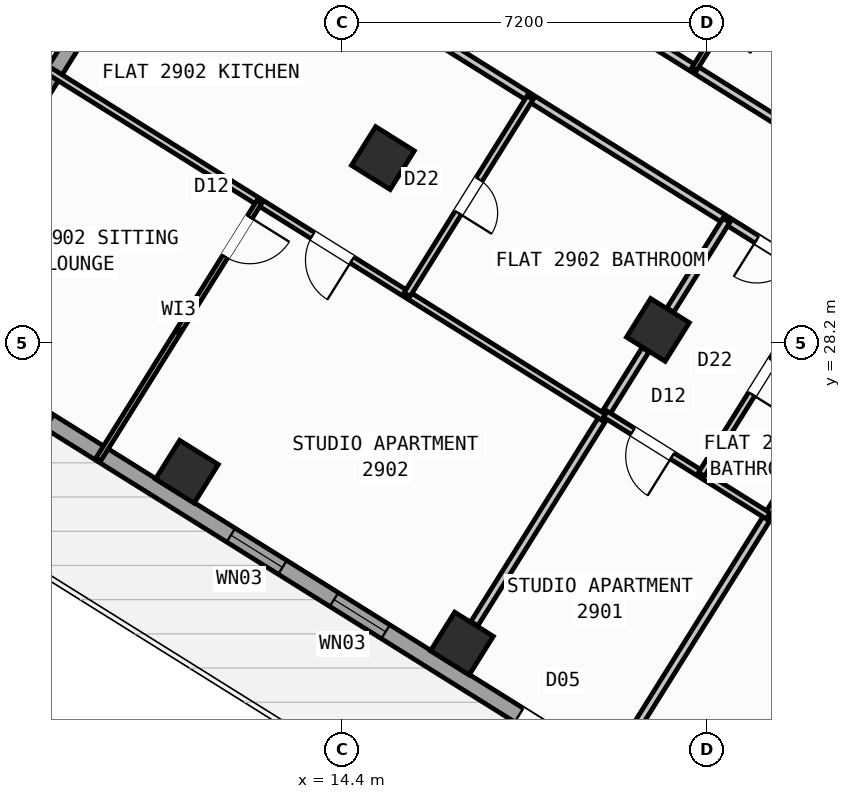
"""IFC4 building model, lengths in metres.
Left out: names, types, materials, properties, quantities, classifications, styles, units other than length and angle.
Written with IfcOpenShell. Run it as: python <this file> out.ifc"""

import sys

from ifc_helpers import new_model, si_unit, direction, frame, frame_2d, origin, origin_2d, place, context, subcontext, project, spatial, rectangle, hollow_rectangle, extrude, source, transform, mapped, element, fill, save


model = new_model("IFC4")
c1 = context("Model", 3, precision=1e-05, world=origin(), true_north=direction((0.0, 1.0)))
c2 = subcontext(c1, "Body", "Model", "MODEL_VIEW")
j1 = project(units=[si_unit("LENGTHUNIT", "METRE"), si_unit("PLANEANGLEUNIT", "RADIAN")], contexts=[c1])
p1 = place(None, origin())
s1 = spatial("IfcSite", under=j1, at=p1, CompositionType="ELEMENT")
p2 = place(p1, origin())
s2 = spatial("IfcBuilding", under=s1, at=p2, CompositionType="ELEMENT")
p3 = place(p2, frame((0.0, 0.0, 116.1)))
s3 = spatial("IfcBuildingStorey", under=s2, at=p3, CompositionType="ELEMENT", Elevation=116.1)
p4 = place(p3, frame((26.007, 24.976, 0.0), z_axis=(0.0, 0.0, 1.0), x_axis=(-0.529923795287, -0.848045264823, 0.0)))
e1 = element("IfcWall", 1, at=p4, inside=s3, PredefinedType="SHEAR", context=c2, shape_type="SweptSolid", body=[
    extrude(rectangle(XDim=6.425, YDim=0.55, at=frame_2d((3.212, 0.0))), origin(), (0.0, 0.0, 1.0), 3.35),
])
m1 = source(origin(), c2, "Body", "SweptSolid", [
    extrude(hollow_rectangle(XDim=0.9, YDim=0.9, WallThickness=0.036, at=origin_2d()), origin(), (0.0, 0.0, 1.0), 3.6),
])
for number, where, z_axis, x_axis in (
    (2, (20.632, 28.452, 0.0), (0.0, 0.0, 1.0), (-0.848, 0.53, 0.0)),
    (3, (16.764, 22.261, 0.0), (0.0, 0.0, 1.0), (-0.848, 0.53, 0.0)),
    (4, (15.205, 31.844, 0.0), (0.0, 0.0, 1.0), (-0.848, 0.53, 0.0)),
    (5, (11.336, 25.653, 0.0), (0.0, 0.0, 1.0), (-0.848, 0.53, 0.0)),
):
    element("IfcColumn", number, at=place(p3, frame(where, z_axis=z_axis, x_axis=x_axis)), inside=s3, PredefinedType="COLUMN", context=c2, shape_type="MappedRepresentation", body=[
        mapped(m1, transform((0.0, 0.0, 0.0), scale=1.0)),
    ])
p5 = place(p3, frame((31.76, 12.183, 0.0), z_axis=(0.0, 0.0, 1.0), x_axis=(-0.848047074256, 0.529920899612, 0.0)))
e6 = element("IfcWall", 6, at=p5, inside=s3, PredefinedType="STANDARD", context=c2, shape_type="SweptSolid", body=[
    extrude(rectangle(XDim=30.652, YDim=0.32, at=frame_2d((15.326, 0.0))), origin(), (0.0, 0.0, 1.0), 3.35),
])
p6 = place(p5, frame((15.153, 0.0, 0.0)))
e7 = element("IfcOpeningElement", 7, at=p6, cuts=e6, PredefinedType="OPENING", context=c2, shape_type="SweptSolid", body=[
    extrude(rectangle(XDim=1.2, YDim=2.15, at=frame_2d((0.6, 1.075))), frame((0.0, 0.17, 0.0), z_axis=(0.0, -1.0, 0.0), x_axis=(1.0, 0.0, 0.0)), (0.0, 0.0, 1.0), 0.34),
])
p7 = place(p5, frame((2.002, 0.0, 0.8)))
e8 = element("IfcOpeningElement", 8, at=p7, cuts=e6, PredefinedType="OPENING", context=c2, shape_type="SweptSolid", body=[
    extrude(rectangle(XDim=2.1, YDim=1.55, at=frame_2d((1.05, 0.775))), frame((0.0, 0.17, 0.0), z_axis=(0.0, -1.0, 0.0), x_axis=(1.0, 0.0, 0.0)), (0.0, 0.0, 1.0), 0.34),
])
p8 = place(p5, frame((7.206, 0.0, 0.8)))
e9 = element("IfcOpeningElement", 9, at=p8, cuts=e6, PredefinedType="OPENING", context=c2, shape_type="SweptSolid", body=[
    extrude(rectangle(XDim=2.1, YDim=1.55, at=frame_2d((1.05, 0.775))), frame((0.0, 0.17, 0.0), z_axis=(0.0, -1.0, 0.0), x_axis=(1.0, 0.0, 0.0)), (0.0, 0.0, 1.0), 0.34),
])
p9 = place(p5, frame((12.648, 0.0, 1.0)))
e10 = element("IfcOpeningElement", 10, at=p9, cuts=e6, PredefinedType="OPENING", context=c2, shape_type="SweptSolid", body=[
    extrude(rectangle(XDim=0.9, YDim=1.25, at=frame_2d((0.45, 0.625))), frame((0.0, 0.17, 0.0), z_axis=(0.0, -1.0, 0.0), x_axis=(1.0, 0.0, 0.0)), (0.0, 0.0, 1.0), 0.34),
])
p10 = place(p5, frame((19.458, 0.0, 0.95)))
e11 = element("IfcOpeningElement", 11, at=p10, cuts=e6, PredefinedType="OPENING", context=c2, shape_type="SweptSolid", body=[
    extrude(rectangle(XDim=1.2, YDim=1.4, at=frame_2d((0.6, 0.7))), frame((0.0, 0.17, 0.0), z_axis=(0.0, -1.0, 0.0), x_axis=(1.0, 0.0, 0.0)), (0.0, 0.0, 1.0), 0.34),
])
p11 = place(p5, frame((21.858, 0.0, 0.95)))
e12 = element("IfcOpeningElement", 12, at=p11, cuts=e6, PredefinedType="OPENING", context=c2, shape_type="SweptSolid", body=[
    extrude(rectangle(XDim=1.2, YDim=1.4, at=frame_2d((0.6, 0.7))), frame((0.0, 0.17, 0.0), z_axis=(0.0, -1.0, 0.0), x_axis=(1.0, 0.0, 0.0)), (0.0, 0.0, 1.0), 0.34),
])
p12 = place(p5, frame((27.266, 0.0, 0.8)))
e13 = element("IfcOpeningElement", 13, at=p12, cuts=e6, PredefinedType="OPENING", context=c2, shape_type="SweptSolid", body=[
    extrude(rectangle(XDim=2.1, YDim=1.55, at=frame_2d((1.05, 0.775))), frame((0.0, 0.17, 0.0), z_axis=(0.0, -1.0, 0.0), x_axis=(1.0, 0.0, 0.0)), (0.0, 0.0, 1.0), 0.34),
])
p13 = place(p3, frame((5.7, 28.71, 0.0), z_axis=(0.0, 0.0, 1.0), x_axis=(0.529923711467, 0.8480453172, 0.0)))
e14 = element("IfcWall", 14, at=p13, inside=s3, PredefinedType="STANDARD", context=c2, shape_type="SweptSolid", body=[
    extrude(rectangle(XDim=21.587, YDim=0.32, at=frame_2d((10.794, 0.0))), origin(), (0.0, 0.0, 1.0), 2.775),
])
p14 = place(p13, frame((2.119, 0.0, 0.8)))
e15 = element("IfcOpeningElement", 15, at=p14, cuts=e14, PredefinedType="OPENING", context=c2, shape_type="SweptSolid", body=[
    extrude(rectangle(XDim=2.1, YDim=1.55, at=frame_2d((1.05, 0.775))), frame((0.0, 0.17, 0.0), z_axis=(0.0, -1.0, 0.0), x_axis=(1.0, 0.0, 0.0)), (0.0, 0.0, 1.0), 0.34),
])
p15 = place(p13, frame((17.256, 0.0, 0.85)))
e16 = element("IfcOpeningElement", 16, at=p15, cuts=e14, PredefinedType="OPENING", context=c2, shape_type="SweptSolid", body=[
    extrude(rectangle(XDim=1.8, YDim=1.5, at=frame_2d((0.9, 0.75))), frame((0.0, 0.17, 0.0), z_axis=(0.0, -1.0, 0.0), x_axis=(1.0, 0.0, 0.0)), (0.0, 0.0, 1.0), 0.34),
])
p16 = place(p3, frame((17.424, 47.083, 0.0), z_axis=(0.0, 0.0, 1.0), x_axis=(0.848049927979, -0.529916332693, 0.0)))
e17 = element("IfcWall", 17, at=p16, inside=s3, PredefinedType="STANDARD", context=c2, shape_type="SweptSolid", body=[
    extrude(rectangle(XDim=29.223, YDim=0.32, at=frame_2d((14.612, 0.0))), origin(), (0.0, 0.0, 1.0), 3.35),
])
p17 = place(p16, frame((8.839, 0.0, 0.0)))
e18 = element("IfcOpeningElement", 18, at=p17, cuts=e17, PredefinedType="OPENING", context=c2, shape_type="SweptSolid", body=[
    extrude(rectangle(XDim=1.05, YDim=2.15, at=frame_2d((0.525, 1.075))), frame((0.0, 0.17, 0.0), z_axis=(0.0, -1.0, 0.0), x_axis=(1.0, 0.0, 0.0)), (0.0, 0.0, 1.0), 0.34),
])
p18 = place(p16, frame((0.719, 0.0, 0.85)))
e19 = element("IfcOpeningElement", 19, at=p18, cuts=e17, PredefinedType="OPENING", context=c2, shape_type="SweptSolid", body=[
    extrude(rectangle(XDim=1.8, YDim=1.5, at=frame_2d((0.9, 0.75))), frame((0.0, 0.17, 0.0), z_axis=(0.0, -1.0, 0.0), x_axis=(1.0, 0.0, 0.0)), (0.0, 0.0, 1.0), 0.34),
])
p19 = place(p16, frame((3.981, 0.0, 0.85)))
e20 = element("IfcOpeningElement", 20, at=p19, cuts=e17, PredefinedType="OPENING", context=c2, shape_type="SweptSolid", body=[
    extrude(rectangle(XDim=1.5, YDim=1.5, at=frame_2d((0.75, 0.75))), frame((0.0, 0.17, 0.0), z_axis=(0.0, -1.0, 0.0), x_axis=(1.0, 0.0, 0.0)), (0.0, 0.0, 1.0), 0.34),
])
p20 = place(p16, frame((7.021, 0.0, 0.95)))
e21 = element("IfcOpeningElement", 21, at=p20, cuts=e17, PredefinedType="OPENING", context=c2, shape_type="SweptSolid", body=[
    extrude(rectangle(XDim=1.2, YDim=1.4, at=frame_2d((0.6, 0.7))), frame((0.0, 0.17, 0.0), z_axis=(0.0, -1.0, 0.0), x_axis=(1.0, 0.0, 0.0)), (0.0, 0.0, 1.0), 0.34),
])
p21 = place(p16, frame((14.471, 0.0, 0.95)))
e22 = element("IfcOpeningElement", 22, at=p21, cuts=e17, PredefinedType="OPENING", context=c2, shape_type="SweptSolid", body=[
    extrude(rectangle(XDim=1.2, YDim=1.4, at=frame_2d((0.6, 0.7))), frame((0.0, 0.17, 0.0), z_axis=(0.0, -1.0, 0.0), x_axis=(1.0, 0.0, 0.0)), (0.0, 0.0, 1.0), 0.34),
])
p22 = place(p16, frame((17.254, 0.0, 1.0)))
e23 = element("IfcOpeningElement", 23, at=p22, cuts=e17, PredefinedType="OPENING", context=c2, shape_type="SweptSolid", body=[
    extrude(rectangle(XDim=0.9, YDim=1.25, at=frame_2d((0.45, 0.625))), frame((0.0, 0.17, 0.0), z_axis=(0.0, -1.0, 0.0), x_axis=(1.0, 0.0, 0.0)), (0.0, 0.0, 1.0), 0.34),
])
p23 = place(p16, frame((20.764, 0.0, 0.8)))
e24 = element("IfcOpeningElement", 24, at=p23, cuts=e17, PredefinedType="OPENING", context=c2, shape_type="SweptSolid", body=[
    extrude(rectangle(XDim=2.1, YDim=1.55, at=frame_2d((1.05, 0.775))), frame((0.0, 0.17, 0.0), z_axis=(0.0, -1.0, 0.0), x_axis=(1.0, 0.0, 0.0)), (0.0, 0.0, 1.0), 0.34),
])
p24 = place(p16, frame((25.403, 0.0, 0.8)))
e25 = element("IfcOpeningElement", 25, at=p24, cuts=e17, PredefinedType="OPENING", context=c2, shape_type="SweptSolid", body=[
    extrude(rectangle(XDim=2.1, YDim=1.55, at=frame_2d((1.05, 0.775))), frame((0.0, 0.17, 0.0), z_axis=(0.0, -1.0, 0.0), x_axis=(1.0, 0.0, 0.0)), (0.0, 0.0, 1.0), 0.34),
])
p25 = place(p3, frame((25.198, 28.606, 0.0), z_axis=(0.0, 0.0, 1.0), x_axis=(-0.529926497642, -0.848043576178, 0.0)))
e26 = element("IfcWall", 26, at=p25, inside=s3, PredefinedType="PARTITIONING", context=c2, shape_type="SweptSolid", body=[
    extrude(rectangle(XDim=10.3, YDim=0.16, at=frame_2d((5.15, 0.0))), origin(), (0.0, 0.0, 1.0), 3.34),
])
p26 = place(p3, frame((26.363, 30.472, 0.0), z_axis=(0.0, 0.0, 1.0), x_axis=(-0.848052408131, 0.529912363569, 0.0)))
e27 = element("IfcWall", 27, at=p26, inside=s3, PredefinedType="PARTITIONING", context=c2, shape_type="SweptSolid", body=[
    extrude(rectangle(XDim=16.73, YDim=0.16, at=frame_2d((8.365, 0.0))), origin(), (0.0, 0.0, 1.0), 3.34),
])
p27 = place(p26, frame((7.55, 0.0, 0.0)))
e28 = element("IfcOpeningElement", 28, at=p27, cuts=e27, PredefinedType="OPENING", context=c2, shape_type="SweptSolid", body=[
    extrude(rectangle(XDim=1.0, YDim=2.1, at=frame_2d((0.5, 1.05))), frame((0.0, 0.09, 0.0), z_axis=(0.0, -1.0, 0.0), x_axis=(1.0, 0.0, 0.0)), (0.0, 0.0, 1.0), 0.18),
])
p28 = place(p26, frame((11.14, 0.0, 0.0)))
e29 = element("IfcOpeningElement", 29, at=p28, cuts=e27, PredefinedType="OPENING", context=c2, shape_type="SweptSolid", body=[
    extrude(rectangle(XDim=1.0, YDim=2.1, at=frame_2d((0.5, 1.05))), frame((0.0, 0.09, 0.0), z_axis=(0.0, -1.0, 0.0), x_axis=(1.0, 0.0, 0.0)), (0.0, 0.0, 1.0), 0.18),
])
p29 = place(p3, frame((25.198, 28.606, 0.0), z_axis=(0.0, 0.0, 1.0), x_axis=(-0.848052408131, 0.529912363569, 0.0)))
e30 = element("IfcWall", 30, at=p29, inside=s3, PredefinedType="PARTITIONING", context=c2, shape_type="SweptSolid", body=[
    extrude(rectangle(XDim=16.73, YDim=0.16, at=frame_2d((8.365, 0.0))), origin(), (0.0, 0.0, 1.0), 3.34),
])
p30 = place(p29, frame((2.22, 0.0, 0.0)))
e31 = element("IfcOpeningElement", 31, at=p30, cuts=e30, PredefinedType="OPENING", context=c2, shape_type="SweptSolid", body=[
    extrude(rectangle(XDim=0.86, YDim=2.05, at=frame_2d((0.43, 1.025))), frame((0.0, 0.09, 0.0), z_axis=(0.0, -1.0, 0.0), x_axis=(1.0, 0.0, 0.0)), (0.0, 0.0, 1.0), 0.18),
])
p31 = place(p29, frame((12.084, 0.0, 0.0)))
e32 = element("IfcOpeningElement", 32, at=p31, cuts=e30, PredefinedType="OPENING", context=c2, shape_type="SweptSolid", body=[
    extrude(rectangle(XDim=1.0, YDim=2.1, at=frame_2d((0.5, 1.05))), frame((0.0, 0.09, 0.0), z_axis=(0.0, -1.0, 0.0), x_axis=(1.0, 0.0, 0.0)), (0.0, 0.0, 1.0), 0.18),
])
p32 = place(p3, frame((21.983, 30.615, 0.0), z_axis=(0.0, 0.0, 1.0), x_axis=(-0.529956894714, -0.848024580862, 0.0)))
e33 = element("IfcWall", 33, at=p32, inside=s3, PredefinedType="PARTITIONING", context=c2, shape_type="SweptSolid", body=[
    extrude(rectangle(XDim=2.088, YDim=0.16, at=frame_2d((1.044, 0.0))), origin(), (0.0, 0.0, 1.0), 2.775),
])
p33 = place(p3, frame((20.387, 28.06, 0.0), z_axis=(0.0, 0.0, 1.0), x_axis=(-0.529902564924, -0.848058530814, 0.0)))
e34 = element("IfcWall", 34, at=p33, inside=s3, PredefinedType="PARTITIONING", context=c2, shape_type="SweptSolid", body=[
    extrude(rectangle(XDim=6.376, YDim=0.16, at=frame_2d((3.188, 0.0))), origin(), (0.0, 0.0, 1.0), 2.775),
])
p34 = place(p3, frame((22.807, 24.781, 0.0), z_axis=(0.0, 0.0, 1.0), x_axis=(-0.84803087207, 0.529946827537, 0.0)))
e35 = element("IfcWall", 35, at=p34, inside=s3, PredefinedType="PLUMBINGWALL", context=c2, shape_type="SweptSolid", body=[
    extrude(rectangle(XDim=3.79, YDim=0.14, at=frame_2d((1.895, 0.0))), origin(), (0.0, 0.0, 1.0), 3.34),
])
p35 = place(p34, frame((2.23, 0.0, 0.0)))
e36 = element("IfcOpeningElement", 36, at=p35, cuts=e35, PredefinedType="OPENING", context=c2, shape_type="SweptSolid", body=[
    extrude(rectangle(XDim=0.92, YDim=2.08, at=frame_2d((0.46, 1.04))), frame((0.0, 0.08, 0.0), z_axis=(0.0, -1.0, 0.0), x_axis=(1.0, 0.0, 0.0)), (0.0, 0.0, 1.0), 0.16),
])
p36 = place(p3, frame((23.883, 29.427, 0.0), z_axis=(0.0, 0.0, 1.0), x_axis=(-0.529950281337, -0.84802871373, 0.0)))
e37 = element("IfcWall", 37, at=p36, inside=s3, PredefinedType="PLUMBINGWALL", context=c2, shape_type="SweptSolid", body=[
    extrude(rectangle(XDim=4.51, YDim=0.14, at=frame_2d((2.255, 0.0))), origin(), (0.0, 0.0, 1.0), 2.995),
])
p37 = place(p36, frame((1.865, 0.0, 0.0)))
e38 = element("IfcOpeningElement", 38, at=p37, cuts=e37, PredefinedType="OPENING", context=c2, shape_type="SweptSolid", body=[
    extrude(rectangle(XDim=0.78, YDim=2.05, at=frame_2d((0.39, 1.025))), frame((0.0, 0.08, 0.0), z_axis=(0.0, -1.0, 0.0), x_axis=(1.0, 0.0, 0.0)), (0.0, 0.0, 1.0), 0.16),
])
p38 = place(p3, frame((19.556, 26.73, 0.0), z_axis=(0.0, 0.0, 1.0), x_axis=(-0.848043949058, 0.52992590092, 0.0)))
e39 = element("IfcWall", 39, at=p38, inside=s3, PredefinedType="PLUMBINGWALL", context=c2, shape_type="SweptSolid", body=[
    extrude(rectangle(XDim=12.92, YDim=0.14, at=frame_2d((6.46, 0.0))), origin(), (0.0, 0.0, 1.0), 3.34),
])
p39 = place(p38, frame((5.849, 0.0, 0.0)))
e40 = element("IfcOpeningElement", 40, at=p39, cuts=e39, PredefinedType="OPENING", context=c2, shape_type="SweptSolid", body=[
    extrude(rectangle(XDim=0.92, YDim=2.08, at=frame_2d((0.46, 1.04))), frame((0.0, 0.08, 0.0), z_axis=(0.0, -1.0, 0.0), x_axis=(1.0, 0.0, 0.0)), (0.0, 0.0, 1.0), 0.16),
])
p40 = place(p3, frame((18.109, 33.035, 0.0), z_axis=(0.0, 0.0, 1.0), x_axis=(-0.529893526057, -0.848064178611, 0.0)))
e41 = element("IfcWall", 41, at=p40, inside=s3, PredefinedType="PLUMBINGWALL", context=c2, shape_type="SweptSolid", body=[
    extrude(rectangle(XDim=4.58, YDim=0.14, at=frame_2d((2.29, 0.0))), origin(), (0.0, 0.0, 1.0), 3.34),
])
p41 = place(p40, frame((1.9, 0.0, 0.0)))
e42 = element("IfcOpeningElement", 42, at=p41, cuts=e41, PredefinedType="OPENING", context=c2, shape_type="SweptSolid", body=[
    extrude(rectangle(XDim=0.78, YDim=2.05, at=frame_2d((0.39, 1.025))), frame((0.0, 0.08, 0.0), z_axis=(0.0, -1.0, 0.0), x_axis=(1.0, 0.0, 0.0)), (0.0, 0.0, 1.0), 0.16),
])
p42 = place(p3, frame((12.763, 30.975, 0.0), z_axis=(0.0, 0.0, 1.0), x_axis=(-0.529947646893, -0.848030360042, 0.0)))
e43 = element("IfcWall", 43, at=p42, inside=s3, PredefinedType="PARTITIONING", context=c2, shape_type="SweptSolid", body=[
    extrude(rectangle(XDim=5.99, YDim=0.11, at=frame_2d((2.995, 0.0))), origin(), (0.0, 0.0, 1.0), 3.34),
])
p43 = place(p42, frame((0.35, 0.0, 0.0)))
e44 = element("IfcOpeningElement", 44, at=p43, cuts=e43, PredefinedType="OPENING", context=c2, shape_type="SweptSolid", body=[
    extrude(rectangle(XDim=0.92, YDim=2.08, at=frame_2d((0.46, 1.04))), frame((0.0, 0.065, 0.0), z_axis=(0.0, -1.0, 0.0), x_axis=(1.0, 0.0, 0.0)), (0.0, 0.0, 1.0), 0.13),
])
p44 = place(p3, frame((26.37, 41.635, 0.0), z_axis=(0.0, 0.0, 1.0), x_axis=(-0.529917830441, -0.848048992088, 0.0)))
e45 = element("IfcWall", 45, at=p44, inside=s3, PredefinedType="PARTITIONING", context=c2, shape_type="SweptSolid", body=[
    extrude(rectangle(XDim=9.47, YDim=0.11, at=frame_2d((4.735, 0.0))), origin(), (0.0, 0.0, 1.0), 2.995),
])
p45 = place(p44, frame((7.83, 0.0, 0.0)))
e46 = element("IfcOpeningElement", 46, at=p45, cuts=e45, PredefinedType="OPENING", context=c2, shape_type="SweptSolid", body=[
    extrude(rectangle(XDim=0.78, YDim=2.05, at=frame_2d((0.39, 1.025))), frame((0.0, 0.065, 0.0), z_axis=(0.0, -1.0, 0.0), x_axis=(1.0, 0.0, 0.0)), (0.0, 0.0, 1.0), 0.13),
])
p46 = place(p44, frame((3.075, 0.0, 0.0)))
e47 = element("IfcOpeningElement", 47, at=p46, cuts=e45, PredefinedType="OPENING", context=c2, shape_type="SweptSolid", body=[
    extrude(rectangle(XDim=0.92, YDim=2.08, at=frame_2d((0.46, 1.04))), frame((0.0, 0.065, 0.0), z_axis=(0.0, -1.0, 0.0), x_axis=(1.0, 0.0, 0.0)), (0.0, 0.0, 1.0), 0.13),
])
m2 = source(origin(), c2, "Body", "SweptSolid", [
    extrude(rectangle(XDim=1.2, YDim=2.15, at=frame_2d((0.6, 1.075))), frame((0.0, 0.025, 0.0), z_axis=(0.0, -1.0, 0.0), x_axis=(1.0, 0.0, 0.0)), (0.0, 0.0, 1.0), 0.05),
])
p47 = place(p6, origin())
e48 = element("IfcDoor", 48, at=p47, inside=s3, OperationType="SINGLE_SWING_LEFT", PredefinedType="DOOR", context=c2, shape_type="MappedRepresentation", body=[
    mapped(m2, transform((0.0, 0.0, 0.0), scale=1.0)),
])
fill(e7, e48)
m3 = source(origin(), c2, "Body", "SweptSolid", [
    extrude(rectangle(XDim=1.2, YDim=1.4, at=frame_2d((0.6, 0.7))), frame((0.0, 0.03, 0.0), z_axis=(0.0, -1.0, 0.0), x_axis=(1.0, 0.0, 0.0)), (0.0, 0.0, 1.0), 0.06),
])
p48 = place(p10, origin())
e49 = element("IfcWindow", 49, at=p48, inside=s3, PartitioningType="SINGLE_PANEL", PredefinedType="WINDOW", context=c2, shape_type="MappedRepresentation", body=[
    mapped(m3, transform((0.0, 0.0, 0.0), scale=1.0)),
])
fill(e11, e49)
p49 = place(p11, origin())
e50 = element("IfcWindow", 50, at=p49, inside=s3, PartitioningType="SINGLE_PANEL", PredefinedType="WINDOW", context=c2, shape_type="MappedRepresentation", body=[
    mapped(m3, transform((0.0, 0.0, 0.0), scale=1.0)),
])
fill(e12, e50)
m4 = source(origin(), c2, "Body", "SweptSolid", [
    extrude(rectangle(XDim=0.86, YDim=2.05, at=frame_2d((0.43, 1.025))), frame((0.0, 0.025, 0.0), z_axis=(0.0, -1.0, 0.0), x_axis=(1.0, 0.0, 0.0)), (0.0, 0.0, 1.0), 0.05),
])
p50 = place(p30, origin())
e51 = element("IfcDoor", 51, at=p50, inside=s3, OperationType="SINGLE_SWING_RIGHT", PredefinedType="DOOR", context=c2, shape_type="MappedRepresentation", body=[
    mapped(m4, transform((0.0, 0.0, 0.0), scale=1.0)),
])
fill(e31, e51)
m5 = source(origin(), c2, "Body", "SweptSolid", [
    extrude(rectangle(XDim=0.92, YDim=2.08, at=frame_2d((0.46, 1.04))), frame((0.0, 0.025, 0.0), z_axis=(0.0, -1.0, 0.0), x_axis=(1.0, 0.0, 0.0)), (0.0, 0.0, 1.0), 0.05),
])
p51 = place(p35, origin())
e52 = element("IfcDoor", 52, at=p51, inside=s3, OperationType="SINGLE_SWING_LEFT", PredefinedType="DOOR", context=c2, shape_type="MappedRepresentation", body=[
    mapped(m5, transform((0.0, 0.0, 0.0), scale=1.0)),
])
fill(e36, e52)
m6 = source(origin(), c2, "Body", "SweptSolid", [
    extrude(rectangle(XDim=0.78, YDim=2.05, at=frame_2d((0.39, 1.025))), frame((0.0, 0.025, 0.0), z_axis=(0.0, -1.0, 0.0), x_axis=(1.0, 0.0, 0.0)), (0.0, 0.0, 1.0), 0.05),
])
p52 = place(p37, origin())
e53 = element("IfcDoor", 53, at=p52, inside=s3, OperationType="SINGLE_SWING_RIGHT", PredefinedType="DOOR", context=c2, shape_type="MappedRepresentation", body=[
    mapped(m6, transform((0.0, 0.0, 0.0), scale=1.0)),
])
fill(e38, e53)
p53 = place(p43, origin())
e54 = element("IfcDoor", 54, at=p53, inside=s3, OperationType="SINGLE_SWING_LEFT", PredefinedType="DOOR", context=c2, shape_type="MappedRepresentation", body=[
    mapped(m5, transform((0.0, 0.0, 0.0), scale=1.0)),
])
fill(e44, e54)
p54 = place(p39, origin())
e55 = element("IfcDoor", 55, at=p54, inside=s3, OperationType="SINGLE_SWING_LEFT", PredefinedType="DOOR", context=c2, shape_type="MappedRepresentation", body=[
    mapped(m5, transform((0.0, 0.0, 0.0), scale=1.0)),
])
fill(e40, e55)
p55 = place(p41, origin())
e56 = element("IfcDoor", 56, at=p55, inside=s3, OperationType="SINGLE_SWING_RIGHT", PredefinedType="DOOR", context=c2, shape_type="MappedRepresentation", body=[
    mapped(m6, transform((0.0, 0.0, 0.0), scale=1.0)),
])
fill(e42, e56)
save(model, sys.argv[1])
